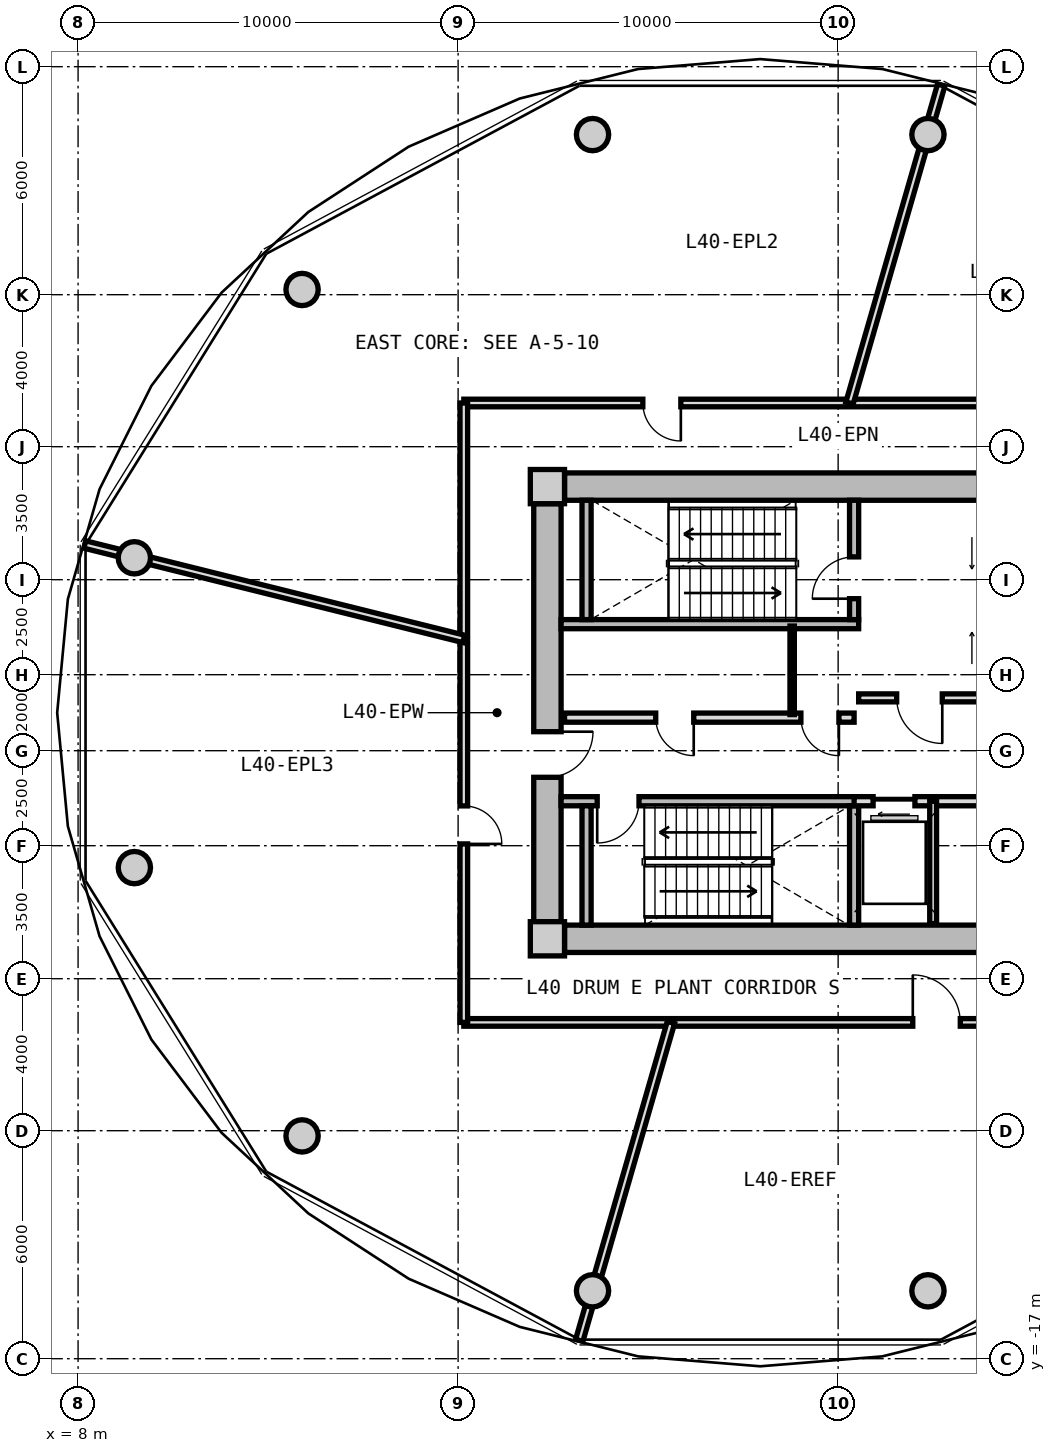
"""IFC4 building model, lengths in metres.
Left out: names, types, materials, properties, quantities, classifications, styles, units other than length and angle.
Written with IfcOpenShell. Run it as: python <this file> out.ifc"""

import sys

from ifc_helpers import new_model, si_unit, direction, frame, frame_2d, origin, origin_2d, place, context, subcontext, project, spatial, rectangle, circle, extrude, source, transform, mapped, element, fill, save


model = new_model("IFC4")
c1 = context("Model", 3, precision=1e-05, world=origin(), true_north=direction((0.0, 1.0)))
c2 = subcontext(c1, "Body", "Model", "MODEL_VIEW")
j1 = project(units=[si_unit("LENGTHUNIT", "METRE"), si_unit("PLANEANGLEUNIT", "RADIAN")], contexts=[c1])
p1 = place(None, origin())
s1 = spatial("IfcSite", under=j1, at=p1, CompositionType="ELEMENT")
p2 = place(p1, origin())
s2 = spatial("IfcBuilding", under=s1, at=p2, CompositionType="ELEMENT")
p3 = place(p2, frame((0.0, 0.0, 129.8)))
s3 = spatial("IfcBuildingStorey", under=s2, at=p3, CompositionType="ELEMENT", Elevation=129.8)
m1 = source(origin(), c2, "Body", "SweptSolid", [
    extrude(rectangle(XDim=0.9, YDim=0.9, at=origin_2d()), origin(), (0.0, 0.0, 1.0), 4.5),
])
for number, where, z_axis, x_axis in (
    (1, (20.35, -5.95, 0.0), (0.0, 0.0, 1.0), (1.0, 0.0, 0.0)),
    (2, (20.35, 5.95, 0.0), (0.0, 0.0, 1.0), (1.0, 0.0, 0.0)),
):
    element("IfcColumn", number, at=place(p3, frame(where, z_axis=z_axis, x_axis=x_axis)), inside=s3, PredefinedType="COLUMN", context=c2, shape_type="MappedRepresentation", body=[
        mapped(m1, transform((0.0, 0.0, 0.0), x_axis=(1.0, 0.0, 0.0), y_axis=(0.0, 1.0, 0.0), z_axis=(0.0, 0.0, 1.0), scale=1.0)),
    ])
m2 = source(origin(), c2, "Body", "SweptSolid", [
    extrude(rectangle(XDim=14.4, YDim=0.72, at=frame_2d((7.2, 0.0))), origin(), (0.0, 0.0, 1.0), 4.08),
])
for number, where, z_axis, x_axis in (
    (3, (20.8, 5.95, 0.0), (0.0, 0.0, 1.0), (1.0, 0.0, 0.0)),
    (4, (35.2, -5.95, 0.0), (0.0, 0.0, 1.0), (-1.0, 0.0, 0.0)),
):
    element("IfcWall", number, at=place(p3, frame(where, z_axis=z_axis, x_axis=x_axis)), inside=s3, PredefinedType="SHEAR", context=c2, shape_type="MappedRepresentation", body=[
        mapped(m2, transform((0.0, 0.0, 0.0), x_axis=(1.0, 0.0, 0.0), y_axis=(0.0, 1.0, 0.0), z_axis=(0.0, 0.0, 1.0), scale=1.0)),
    ])
m3 = source(origin(), c2, "Body", "SweptSolid", [
    extrude(rectangle(XDim=11.0, YDim=0.72, at=frame_2d((5.5, 0.0))), origin(), (0.0, 0.0, 1.0), 4.08),
])
p4 = place(p3, frame((20.35, -5.5, 0.0), z_axis=(0.0, 0.0, 1.0), x_axis=(0.0, 1.0, 0.0)))
e5 = element("IfcWall", 5, at=p4, inside=s3, PredefinedType="SHEAR", context=c2, shape_type="MappedRepresentation", body=[
    mapped(m3, transform((0.0, 0.0, 0.0), x_axis=(1.0, 0.0, 0.0), y_axis=(0.0, 1.0, 0.0), z_axis=(0.0, 0.0, 1.0), scale=1.0)),
])
p5 = place(p4, frame((3.8, 0.0, 0.0)))
e6 = element("IfcOpeningElement", 6, at=p5, cuts=e5, PredefinedType="OPENING", context=c2, shape_type="SweptSolid", body=[
    extrude(rectangle(XDim=1.2, YDim=2.15, at=frame_2d((0.6, 1.075))), frame((0.0, 0.37, 0.0), z_axis=(0.0, -1.0, 0.0), x_axis=(1.0, 0.0, 0.0)), (0.0, 0.0, 1.0), 0.74),
])
m4 = source(origin(), c2, "Body", "SweptSolid", [
    extrude(circle(Radius=0.425, at=origin_2d()), origin(), (0.0, 0.0, 1.0), 4.08),
])
for number, where, z_axis, x_axis in (
    (7, (30.363, 15.213, 0.0), (0.0, 0.0, 1.0), (1.0, 0.0, 0.0)),
    (8, (21.537, 15.213, 0.0), (0.0, 0.0, 1.0), (1.0, 0.0, 0.0)),
    (9, (13.894, 11.137, 0.0), (0.0, 0.0, 1.0), (1.0, 0.0, 0.0)),
    (10, (9.481, 4.076, 0.0), (0.0, 0.0, 1.0), (1.0, 0.0, 0.0)),
    (11, (9.481, -4.076, 0.0), (0.0, 0.0, 1.0), (1.0, 0.0, 0.0)),
    (12, (13.894, -11.137, 0.0), (0.0, 0.0, 1.0), (1.0, 0.0, 0.0)),
    (13, (21.537, -15.213, 0.0), (0.0, 0.0, 1.0), (1.0, 0.0, 0.0)),
    (14, (30.363, -15.213, 0.0), (0.0, 0.0, 1.0), (1.0, 0.0, 0.0)),
):
    element("IfcColumn", number, at=place(p3, frame(where, z_axis=z_axis, x_axis=x_axis)), inside=s3, PredefinedType="COLUMN", context=c2, shape_type="MappedRepresentation", body=[
        mapped(m4, transform((0.0, 0.0, 0.0), x_axis=(1.0, 0.0, 0.0), y_axis=(0.0, 1.0, 0.0), z_axis=(0.0, 0.0, 1.0), scale=1.0)),
    ])
m5 = source(origin(), c2, "Body", "SweptSolid", [
    extrude(rectangle(XDim=7.83, YDim=0.24, at=frame_2d((3.915, 0.0))), origin(), (0.0, 0.0, 1.0), 4.08),
])
p6 = place(p3, frame((20.71, 2.33, 0.0), z_axis=(0.0, 0.0, 1.0), x_axis=(1.0, 0.0, 0.0)))
e15 = element("IfcWall", 15, at=p6, inside=s3, PredefinedType="PARTITIONING", context=c2, shape_type="MappedRepresentation", body=[
    mapped(m5, transform((0.0, 0.0, 0.0), x_axis=(1.0, 0.0, 0.0), y_axis=(0.0, 1.0, 0.0), z_axis=(0.0, 0.0, 1.0), scale=1.0)),
])
m6 = source(origin(), c2, "Body", "SweptSolid", [
    extrude(rectangle(XDim=3.14, YDim=0.24, at=frame_2d((1.57, 0.0))), origin(), (0.0, 0.0, 1.0), 4.08),
])
p7 = place(p3, frame((21.38, 2.45, 0.0), z_axis=(0.0, 0.0, 1.0), x_axis=(0.0, 1.0, 0.0)))
e16 = element("IfcWall", 16, at=p7, inside=s3, PredefinedType="PARTITIONING", context=c2, shape_type="MappedRepresentation", body=[
    mapped(m6, transform((0.0, 0.0, 0.0), x_axis=(1.0, 0.0, 0.0), y_axis=(0.0, 1.0, 0.0), z_axis=(0.0, 0.0, 1.0), scale=1.0)),
])
p8 = place(p3, frame((28.42, 2.45, 0.0), z_axis=(0.0, 0.0, 1.0), x_axis=(0.0, 1.0, 0.0)))
e17 = element("IfcWall", 17, at=p8, inside=s3, PredefinedType="PARTITIONING", context=c2, shape_type="MappedRepresentation", body=[
    mapped(m6, transform((0.0, 0.0, 0.0), x_axis=(1.0, 0.0, 0.0), y_axis=(0.0, 1.0, 0.0), z_axis=(0.0, 0.0, 1.0), scale=1.0)),
])
p9 = place(p8, frame((0.55, 0.0, 0.0)))
e18 = element("IfcOpeningElement", 18, at=p9, cuts=e17, PredefinedType="OPENING", context=c2, shape_type="SweptSolid", body=[
    extrude(rectangle(XDim=1.1, YDim=2.15, at=frame_2d((0.55, 1.075))), frame((0.0, 0.13, 0.0), z_axis=(0.0, -1.0, 0.0), x_axis=(1.0, 0.0, 0.0)), (0.0, 0.0, 1.0), 0.26),
])
p10 = place(p3, frame((20.71, -2.33, 0.0), z_axis=(0.0, 0.0, 1.0), x_axis=(1.0, 0.0, 0.0)))
e19 = element("IfcWall", 19, at=p10, inside=s3, PredefinedType="PARTITIONING", context=c2, shape_type="MappedRepresentation", body=[
    mapped(m5, transform((0.0, 0.0, 0.0), x_axis=(1.0, 0.0, 0.0), y_axis=(0.0, 1.0, 0.0), z_axis=(0.0, 0.0, 1.0), scale=1.0)),
])
p11 = place(p10, frame((0.95, 0.0, 0.0)))
e20 = element("IfcOpeningElement", 20, at=p11, cuts=e19, PredefinedType="OPENING", context=c2, shape_type="SweptSolid", body=[
    extrude(rectangle(XDim=1.1, YDim=2.15, at=frame_2d((0.55, 1.075))), frame((0.0, 0.13, 0.0), z_axis=(0.0, -1.0, 0.0), x_axis=(1.0, 0.0, 0.0)), (0.0, 0.0, 1.0), 0.26),
])
for number, where, z_axis, x_axis in (
    (21, (21.38, -5.59, 0.0), (0.0, 0.0, 1.0), (0.0, 1.0, 0.0)),
    (22, (28.42, -5.59, 0.0), (0.0, 0.0, 1.0), (0.0, 1.0, 0.0)),
):
    element("IfcWall", number, at=place(p3, frame(where, z_axis=z_axis, x_axis=x_axis)), inside=s3, PredefinedType="PARTITIONING", context=c2, shape_type="MappedRepresentation", body=[
        mapped(m6, transform((0.0, 0.0, 0.0), x_axis=(1.0, 0.0, 0.0), y_axis=(0.0, 1.0, 0.0), z_axis=(0.0, 0.0, 1.0), scale=1.0)),
    ])
m7 = source(origin(), c2, "Body", "SweptSolid", [
    extrude(rectangle(XDim=6.66, YDim=0.21, at=frame_2d((3.33, 0.0))), origin(), (0.0, 0.0, 1.0), 4.065),
])
p12 = place(p3, frame((28.54, 0.39, 0.0), z_axis=(0.0, 0.0, 1.0), x_axis=(1.0, 0.0, 0.0)))
e23 = element("IfcWall", 23, at=p12, inside=s3, PredefinedType="PARTITIONING", context=c2, shape_type="MappedRepresentation", body=[
    mapped(m7, transform((0.0, 0.0, 0.0), x_axis=(1.0, 0.0, 0.0), y_axis=(0.0, 1.0, 0.0), z_axis=(0.0, 0.0, 1.0), scale=1.0)),
])
p13 = place(p12, frame((1.0, 0.0, 0.0)))
e24 = element("IfcOpeningElement", 24, at=p13, cuts=e23, PredefinedType="OPENING", context=c2, shape_type="SweptSolid", body=[
    extrude(rectangle(XDim=1.2, YDim=2.15, at=frame_2d((0.6, 1.075))), frame((0.0, 0.115, 0.0), z_axis=(0.0, -1.0, 0.0), x_axis=(1.0, 0.0, 0.0)), (0.0, 0.0, 1.0), 0.23),
])
m8 = source(origin(), c2, "Body", "SweptSolid", [
    extrude(rectangle(XDim=7.62, YDim=0.24, at=frame_2d((3.81, 0.0))), origin(), (0.0, 0.0, 1.0), 4.065),
])
p14 = place(p3, frame((20.8, -0.13, 0.0), z_axis=(0.0, 0.0, 1.0), x_axis=(1.0, 0.0, 0.0)))
e25 = element("IfcWall", 25, at=p14, inside=s3, PredefinedType="PARTITIONING", context=c2, shape_type="MappedRepresentation", body=[
    mapped(m8, transform((0.0, 0.0, 0.0), x_axis=(1.0, 0.0, 0.0), y_axis=(0.0, 1.0, 0.0), z_axis=(0.0, 0.0, 1.0), scale=1.0)),
])
p15 = place(p14, frame((6.22, 0.0, 0.0)))
e26 = element("IfcOpeningElement", 26, at=p15, cuts=e25, PredefinedType="OPENING", context=c2, shape_type="SweptSolid", body=[
    extrude(rectangle(XDim=1.0, YDim=2.1, at=frame_2d((0.5, 1.05))), frame((0.0, 0.13, 0.0), z_axis=(0.0, -1.0, 0.0), x_axis=(1.0, 0.0, 0.0)), (0.0, 0.0, 1.0), 0.26),
])
p16 = place(p14, frame((2.4, 0.0, 0.0)))
e27 = element("IfcOpeningElement", 27, at=p16, cuts=e25, PredefinedType="OPENING", context=c2, shape_type="SweptSolid", body=[
    extrude(rectangle(XDim=1.0, YDim=2.1, at=frame_2d((0.5, 1.05))), frame((0.0, 0.13, 0.0), z_axis=(0.0, -1.0, 0.0), x_axis=(1.0, 0.0, 0.0)), (0.0, 0.0, 1.0), 0.26),
])
m9 = source(origin(), c2, "Body", "SweptSolid", [
    extrude(rectangle(XDim=2.33, YDim=0.115, at=frame_2d((1.165, 0.0))), origin(), (0.0, 0.0, 1.0), 4.065),
])
p17 = place(p3, frame((26.79, -0.05, 0.0), z_axis=(0.0, 0.0, 1.0), x_axis=(0.0, 1.0, 0.0)))
e28 = element("IfcWall", 28, at=p17, inside=s3, PredefinedType="PARTITIONING", context=c2, shape_type="MappedRepresentation", body=[
    mapped(m9, transform((0.0, 0.0, 0.0), x_axis=(1.0, 0.0, 0.0), y_axis=(0.0, 1.0, 0.0), z_axis=(0.0, 0.0, 1.0), scale=1.0)),
])
m10 = source(origin(), c2, "Body", "SweptSolid", [
    extrude(rectangle(XDim=4.13, YDim=0.24, at=frame_2d((2.065, 0.0))), origin(), (0.0, 0.0, 1.0), 4.065),
])
p18 = place(p3, frame((28.42, -2.33, 0.0), z_axis=(0.0, 0.0, 1.0), x_axis=(1.0, 0.0, 0.0)))
e29 = element("IfcWall", 29, at=p18, inside=s3, PredefinedType="PARTITIONING", context=c2, shape_type="MappedRepresentation", body=[
    mapped(m10, transform((0.0, 0.0, 0.0), x_axis=(1.0, 0.0, 0.0), y_axis=(0.0, 1.0, 0.0), z_axis=(0.0, 0.0, 1.0), scale=1.0)),
])
p19 = place(p18, frame((0.5, 0.0, 0.0)))
e30 = element("IfcOpeningElement", 30, at=p19, cuts=e29, PredefinedType="OPENING", context=c2, shape_type="SweptSolid", body=[
    extrude(rectangle(XDim=1.1, YDim=2.2, at=frame_2d((0.55, 1.1))), frame((0.0, 0.13, 0.0), z_axis=(0.0, -1.0, 0.0), x_axis=(1.0, 0.0, 0.0)), (0.0, 0.0, 1.0), 0.26),
])
m11 = source(origin(), c2, "Body", "SweptSolid", [
    extrude(rectangle(XDim=3.22, YDim=0.18, at=frame_2d((1.61, 0.0))), origin(), (0.0, 0.0, 1.0), 4.065),
])
p20 = place(p3, frame((30.5, -5.55, 0.0), z_axis=(0.0, 0.0, 1.0), x_axis=(0.0, 1.0, 0.0)))
e31 = element("IfcWall", 31, at=p20, inside=s3, PredefinedType="PARTITIONING", context=c2, shape_type="MappedRepresentation", body=[
    mapped(m11, transform((0.0, 0.0, 0.0), x_axis=(1.0, 0.0, 0.0), y_axis=(0.0, 1.0, 0.0), z_axis=(0.0, 0.0, 1.0), scale=1.0)),
])
m12 = source(origin(), c2, "Body", "SweptSolid", [
    extrude(rectangle(XDim=19.7, YDim=0.2, at=frame_2d((9.85, 0.0))), origin(), (0.0, 0.0, 1.0), 4.065),
])
p21 = place(p3, frame((18.15, 8.15, 0.0), z_axis=(0.0, 0.0, 1.0), x_axis=(1.0, 0.0, 0.0)))
e32 = element("IfcWall", 32, at=p21, inside=s3, PredefinedType="PARTITIONING", context=c2, shape_type="MappedRepresentation", body=[
    mapped(m12, transform((0.0, 0.0, 0.0), x_axis=(1.0, 0.0, 0.0), y_axis=(0.0, 1.0, 0.0), z_axis=(0.0, 0.0, 1.0), scale=1.0)),
])
p22 = place(p21, frame((4.711, 0.0, 0.0)))
e33 = element("IfcOpeningElement", 33, at=p22, cuts=e32, PredefinedType="OPENING", context=c2, shape_type="SweptSolid", body=[
    extrude(rectangle(XDim=1.0, YDim=2.1, at=frame_2d((0.5, 1.05))), frame((0.0, 0.11, 0.0), z_axis=(0.0, -1.0, 0.0), x_axis=(1.0, 0.0, 0.0)), (0.0, 0.0, 1.0), 0.22),
])
p23 = place(p3, frame((37.85, -8.15, 0.0), z_axis=(0.0, 0.0, 1.0), x_axis=(-1.0, 0.0, 0.0)))
e34 = element("IfcWall", 34, at=p23, inside=s3, PredefinedType="PARTITIONING", context=c2, shape_type="MappedRepresentation", body=[
    mapped(m12, transform((0.0, 0.0, 0.0), x_axis=(1.0, 0.0, 0.0), y_axis=(0.0, 1.0, 0.0), z_axis=(0.0, 0.0, 1.0), scale=1.0)),
])
p24 = place(p23, frame((6.636, 0.0, 0.0)))
e35 = element("IfcOpeningElement", 35, at=p24, cuts=e34, PredefinedType="OPENING", context=c2, shape_type="SweptSolid", body=[
    extrude(rectangle(XDim=1.25, YDim=2.2, at=frame_2d((0.625, 1.1))), frame((0.0, 0.11, 0.0), z_axis=(0.0, -1.0, 0.0), x_axis=(1.0, 0.0, 0.0)), (0.0, 0.0, 1.0), 0.22),
])
m13 = source(origin(), c2, "Body", "SweptSolid", [
    extrude(rectangle(XDim=16.3, YDim=0.2, at=frame_2d((8.15, 0.0))), origin(), (0.0, 0.0, 1.0), 4.065),
])
p25 = place(p3, frame((18.15, -8.15, 0.0), z_axis=(0.0, 0.0, 1.0), x_axis=(0.0, 1.0, 0.0)))
e36 = element("IfcWall", 36, at=p25, inside=s3, PredefinedType="PARTITIONING", context=c2, shape_type="MappedRepresentation", body=[
    mapped(m13, transform((0.0, 0.0, 0.0), x_axis=(1.0, 0.0, 0.0), y_axis=(0.0, 1.0, 0.0), z_axis=(0.0, 0.0, 1.0), scale=1.0)),
])
p26 = place(p25, frame((4.697, 0.0, 0.0)))
e37 = element("IfcOpeningElement", 37, at=p26, cuts=e36, PredefinedType="OPENING", context=c2, shape_type="SweptSolid", body=[
    extrude(rectangle(XDim=1.0, YDim=2.1, at=frame_2d((0.5, 1.05))), frame((0.0, 0.11, 0.0), z_axis=(0.0, -1.0, 0.0), x_axis=(1.0, 0.0, 0.0)), (0.0, 0.0, 1.0), 0.22),
])
m14 = source(origin(), c2, "Body", "SweptSolid", [
    extrude(rectangle(XDim=8.708, YDim=0.2, at=frame_2d((4.354, 0.0))), origin(), (0.0, 0.0, 1.0), 2.515),
])
for number, where, z_axis, x_axis in (
    (38, (23.6, -8.15, 0.0), (0.0, 0.0, 1.0), (-0.277, -0.961, 0.0)),
    (39, (28.3, 8.15, 0.0), (0.0, 0.0, 1.0), (0.277, 0.961, 0.0)),
):
    element("IfcWall", number, at=place(p3, frame(where, z_axis=z_axis, x_axis=x_axis)), inside=s3, PredefinedType="PARTITIONING", context=c2, shape_type="MappedRepresentation", body=[
        mapped(m14, transform((0.0, 0.0, 0.0), x_axis=(1.0, 0.0, 0.0), y_axis=(0.0, 1.0, 0.0), z_axis=(0.0, 0.0, 1.0), scale=1.0)),
    ])
m15 = source(origin(), c2, "Body", "SweptSolid", [
    extrude(rectangle(XDim=10.277, YDim=0.2, at=frame_2d((5.139, 0.0))), origin(), (0.0, 0.0, 1.0), 4.065),
])
p27 = place(p3, frame((18.15, 1.942, 0.0), z_axis=(0.0, 0.0, 1.0), x_axis=(-0.970367056385, 0.241635626271, 0.0)))
e40 = element("IfcWall", 40, at=p27, inside=s3, PredefinedType="PARTITIONING", context=c2, shape_type="MappedRepresentation", body=[
    mapped(m15, transform((0.0, 0.0, 0.0), x_axis=(1.0, 0.0, 0.0), y_axis=(0.0, 1.0, 0.0), z_axis=(0.0, 0.0, 1.0), scale=1.0)),
])
m16 = source(origin(), c2, "Body", "SweptSolid", [
    extrude(rectangle(XDim=1.1, YDim=2.15, at=frame_2d((0.55, 1.075))), frame((0.0, 0.025, 0.0), z_axis=(0.0, -1.0, 0.0), x_axis=(1.0, 0.0, 0.0)), (0.0, 0.0, 1.0), 0.05),
])
p28 = place(p9, origin())
e41 = element("IfcDoor", 41, at=p28, inside=s3, OperationType="SINGLE_SWING_LEFT", PredefinedType="DOOR", context=c2, shape_type="MappedRepresentation", body=[
    mapped(m16, transform((0.0, 0.0, 0.0), x_axis=(1.0, 0.0, 0.0), y_axis=(0.0, 1.0, 0.0), z_axis=(0.0, 0.0, 1.0), scale=1.0)),
])
fill(e18, e41)
p29 = place(p11, frame((1.1, 0.0, 0.0), z_axis=(0.0, 0.0, 1.0), x_axis=(-1.0, 0.0, 0.0)))
e42 = element("IfcDoor", 42, at=p29, inside=s3, OperationType="SINGLE_SWING_RIGHT", PredefinedType="DOOR", context=c2, shape_type="MappedRepresentation", body=[
    mapped(m16, transform((0.0, 0.0, 0.0), x_axis=(1.0, 0.0, 0.0), y_axis=(0.0, 1.0, 0.0), z_axis=(0.0, 0.0, 1.0), scale=1.0)),
])
fill(e20, e42)
m17 = source(origin(), c2, "Body", "SweptSolid", [
    extrude(rectangle(XDim=1.2, YDim=2.15, at=frame_2d((0.6, 1.075))), frame((0.0, 0.025, 0.0), z_axis=(0.0, -1.0, 0.0), x_axis=(1.0, 0.0, 0.0)), (0.0, 0.0, 1.0), 0.05),
])
p30 = place(p13, frame((1.2, 0.0, 0.0), z_axis=(0.0, 0.0, 1.0), x_axis=(-1.0, 0.0, 0.0)))
e43 = element("IfcDoor", 43, at=p30, inside=s3, OperationType="SINGLE_SWING_LEFT", PredefinedType="DOOR", context=c2, shape_type="MappedRepresentation", body=[
    mapped(m17, transform((0.0, 0.0, 0.0), x_axis=(1.0, 0.0, 0.0), y_axis=(0.0, 1.0, 0.0), z_axis=(0.0, 0.0, 1.0), scale=1.0)),
])
fill(e24, e43)
p31 = place(p5, frame((1.2, 0.0, 0.0), z_axis=(0.0, 0.0, 1.0), x_axis=(-1.0, 0.0, 0.0)))
e44 = element("IfcDoor", 44, at=p31, inside=s3, OperationType="SINGLE_SWING_LEFT", PredefinedType="DOOR", context=c2, shape_type="MappedRepresentation", body=[
    mapped(m17, transform((0.0, 0.0, 0.0), x_axis=(1.0, 0.0, 0.0), y_axis=(0.0, 1.0, 0.0), z_axis=(0.0, 0.0, 1.0), scale=1.0)),
])
fill(e6, e44)
m18 = source(origin(), c2, "Body", "SweptSolid", [
    extrude(rectangle(XDim=1.0, YDim=2.1, at=frame_2d((0.5, 1.05))), frame((0.0, 0.025, 0.0), z_axis=(0.0, -1.0, 0.0), x_axis=(1.0, 0.0, 0.0)), (0.0, 0.0, 1.0), 0.05),
])
p32 = place(p15, frame((1.0, 0.0, 0.0), z_axis=(0.0, 0.0, 1.0), x_axis=(-1.0, 0.0, 0.0)))
e45 = element("IfcDoor", 45, at=p32, inside=s3, OperationType="SINGLE_SWING_LEFT", PredefinedType="DOOR", context=c2, shape_type="MappedRepresentation", body=[
    mapped(m18, transform((0.0, 0.0, 0.0), x_axis=(1.0, 0.0, 0.0), y_axis=(0.0, 1.0, 0.0), z_axis=(0.0, 0.0, 1.0), scale=1.0)),
])
fill(e26, e45)
p33 = place(p16, frame((1.0, 0.0, 0.0), z_axis=(0.0, 0.0, 1.0), x_axis=(-1.0, 0.0, 0.0)))
e46 = element("IfcDoor", 46, at=p33, inside=s3, OperationType="SINGLE_SWING_LEFT", PredefinedType="DOOR", context=c2, shape_type="MappedRepresentation", body=[
    mapped(m18, transform((0.0, 0.0, 0.0), x_axis=(1.0, 0.0, 0.0), y_axis=(0.0, 1.0, 0.0), z_axis=(0.0, 0.0, 1.0), scale=1.0)),
])
fill(e27, e46)
m19 = source(origin(), c2, "Body", "SweptSolid", [
    extrude(rectangle(XDim=1.1, YDim=2.2, at=frame_2d((0.55, 1.1))), frame((0.0, 0.025, 0.0), z_axis=(0.0, -1.0, 0.0), x_axis=(1.0, 0.0, 0.0)), (0.0, 0.0, 1.0), 0.05),
])
p34 = place(p19, frame((1.1, 0.0, 0.0), z_axis=(0.0, 0.0, 1.0), x_axis=(-1.0, 0.0, 0.0)))
e47 = element("IfcDoor", 47, at=p34, inside=s3, OperationType="SLIDING_TO_LEFT", PredefinedType="DOOR", context=c2, shape_type="MappedRepresentation", body=[
    mapped(m19, transform((0.0, 0.0, 0.0), x_axis=(1.0, 0.0, 0.0), y_axis=(0.0, 1.0, 0.0), z_axis=(0.0, 0.0, 1.0), scale=1.0)),
])
fill(e30, e47)
m20 = source(origin(), c2, "Body", "SweptSolid", [
    extrude(rectangle(XDim=1.25, YDim=2.2, at=frame_2d((0.625, 1.1))), frame((0.0, 0.025, 0.0), z_axis=(0.0, -1.0, 0.0), x_axis=(1.0, 0.0, 0.0)), (0.0, 0.0, 1.0), 0.05),
])
p35 = place(p24, frame((1.25, 0.0, 0.0), z_axis=(0.0, 0.0, 1.0), x_axis=(-1.0, 0.0, 0.0)))
e48 = element("IfcDoor", 48, at=p35, inside=s3, OperationType="SINGLE_SWING_LEFT", PredefinedType="DOOR", context=c2, shape_type="MappedRepresentation", body=[
    mapped(m20, transform((0.0, 0.0, 0.0), x_axis=(1.0, 0.0, 0.0), y_axis=(0.0, 1.0, 0.0), z_axis=(0.0, 0.0, 1.0), scale=1.0)),
])
fill(e35, e48)
p36 = place(p22, frame((1.0, 0.0, 0.0), z_axis=(0.0, 0.0, 1.0), x_axis=(-1.0, 0.0, 0.0)))
e49 = element("IfcDoor", 49, at=p36, inside=s3, OperationType="SINGLE_SWING_LEFT", PredefinedType="DOOR", context=c2, shape_type="MappedRepresentation", body=[
    mapped(m18, transform((0.0, 0.0, 0.0), x_axis=(1.0, 0.0, 0.0), y_axis=(0.0, 1.0, 0.0), z_axis=(0.0, 0.0, 1.0), scale=1.0)),
])
fill(e33, e49)
p37 = place(p26, frame((1.0, 0.0, 0.0), z_axis=(0.0, 0.0, 1.0), x_axis=(-1.0, 0.0, 0.0)))
e50 = element("IfcDoor", 50, at=p37, inside=s3, OperationType="SINGLE_SWING_RIGHT", PredefinedType="DOOR", context=c2, shape_type="MappedRepresentation", body=[
    mapped(m18, transform((0.0, 0.0, 0.0), x_axis=(1.0, 0.0, 0.0), y_axis=(0.0, 1.0, 0.0), z_axis=(0.0, 0.0, 1.0), scale=1.0)),
])
fill(e37, e50)
save(model, sys.argv[1])
